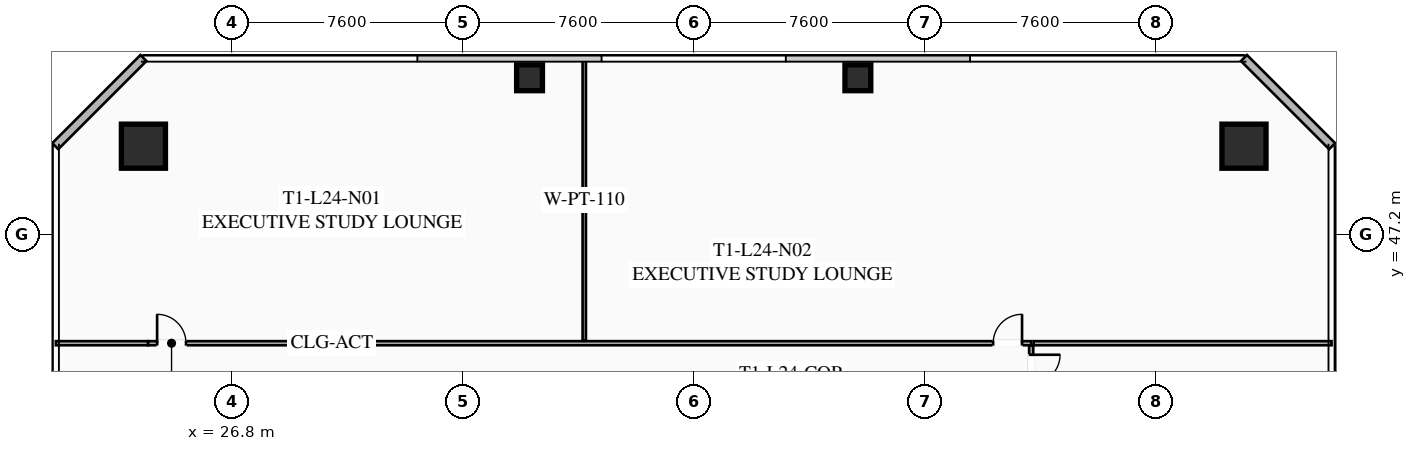
"""IFC4 building model, lengths in metres.
Left out: names, types, materials, properties, quantities, classifications, styles, units other than length and angle.
Written with IfcOpenShell. Run it as: python <this file> out.ifc"""

import sys

from ifc_helpers import new_model, si_unit, direction, frame, frame_2d, origin, origin_2d, place, context, subcontext, project, spatial, rectangle, hollow_rectangle, extrude, element, fill, save


model = new_model("IFC4")
c1 = context("Model", 3, precision=1e-05, world=origin(), true_north=direction((0.0, 1.0)))
c2 = subcontext(c1, "Body", "Model", "MODEL_VIEW")
j1 = project(units=[si_unit("LENGTHUNIT", "METRE"), si_unit("PLANEANGLEUNIT", "RADIAN")], contexts=[c1])
p1 = place(None, origin())
s1 = spatial("IfcSite", under=j1, at=p1, CompositionType="ELEMENT")
p2 = place(p1, origin())
s2 = spatial("IfcBuilding", under=s1, at=p2, CompositionType="ELEMENT")
p3 = place(p2, frame((0.0, 0.0, 92.05)))
s3 = spatial("IfcBuildingStorey", under=s2, at=p3, CompositionType="ELEMENT", Elevation=92.05)
for number, where, z_axis, x_axis in (
    (1, (60.1, 50.1, 0.0), (0.0, 0.0, 1.0), (1.0, 0.0, 0.0)),
    (2, (23.9, 50.1, 0.0), (0.0, 0.0, 1.0), (1.0, 0.0, 0.0)),
):
    element("IfcColumn", number, at=place(p3, frame(where, z_axis=z_axis, x_axis=x_axis)), inside=s3, PredefinedType="COLUMN", context=c2, shape_type="SweptSolid", body=[
        extrude(hollow_rectangle(XDim=1.45, YDim=1.45, WallThickness=0.055, at=origin_2d()), origin(), (0.0, 0.0, 1.0), 3.35),
    ])
for number, where, z_axis, x_axis in (
    (3, (47.4, 52.35, 0.0), (0.0, 0.0, 1.0), (1.0, 0.0, 0.0)),
    (4, (36.6, 52.35, 0.0), (0.0, 0.0, 1.0), (1.0, 0.0, 0.0)),
):
    element("IfcColumn", number, at=place(p3, frame(where, z_axis=z_axis, x_axis=x_axis)), inside=s3, PredefinedType="COLUMN", context=c2, shape_type="SweptSolid", body=[
        extrude(hollow_rectangle(XDim=0.85, YDim=0.85, WallThickness=0.035, at=origin_2d()), origin(), (0.0, 0.0, 1.0), 3.35),
    ])
for number, where, z_axis, x_axis in (
    (5, (21.0, 50.1, 0.0), (0.0, 0.0, 1.0), (0.707, 0.707, 0.0)),
    (6, (60.1, 53.0, 0.0), (0.0, 0.0, 1.0), (0.707, -0.707, 0.0)),
):
    element("IfcWall", number, at=place(p3, frame(where, z_axis=z_axis, x_axis=x_axis)), inside=s3, PredefinedType="SOLIDWALL", context=c2, shape_type="SweptSolid", body=[
        extrude(rectangle(XDim=4.101, YDim=0.28, at=frame_2d((2.051, 0.0))), origin(), (0.0, 0.0, 1.0), 3.35),
    ])
p4 = place(p3, frame((24.05, 43.62, 0.0), z_axis=(0.0, 0.0, 1.0), x_axis=(1.0, 0.0, 0.0)))
e7 = element("IfcWall", 7, at=p4, inside=s3, PredefinedType="PARTITIONING", context=c2, shape_type="SweptSolid", body=[
    extrude(rectangle(XDim=29.05, YDim=0.135, at=frame_2d((14.525, 0.0))), origin(), (0.0, 0.0, 1.0), 2.703),
])
p5 = place(p4, frame((0.3, 0.0, 0.0)))
e8 = element("IfcOpeningElement", 8, at=p5, cuts=e7, PredefinedType="OPENING", context=c2, shape_type="SweptSolid", body=[
    extrude(rectangle(XDim=0.95, YDim=2.05, at=frame_2d((0.475, 1.025))), frame((0.0, 0.077, 0.0), z_axis=(0.0, -1.0, 0.0), x_axis=(1.0, 0.0, 0.0)), (0.0, 0.0, 1.0), 0.155),
])
p6 = place(p4, frame((27.8, 0.0, 0.0)))
e9 = element("IfcOpeningElement", 9, at=p6, cuts=e7, PredefinedType="OPENING", context=c2, shape_type="SweptSolid", body=[
    extrude(rectangle(XDim=0.95, YDim=2.05, at=frame_2d((0.475, 1.025))), frame((0.0, 0.077, 0.0), z_axis=(0.0, -1.0, 0.0), x_axis=(1.0, 0.0, 0.0)), (0.0, 0.0, 1.0), 0.155),
])
p7 = place(p3, frame((21.02, 43.62, 0.0), z_axis=(0.0, 0.0, 1.0), x_axis=(1.0, 0.0, 0.0)))
e10 = element("IfcWall", 10, at=p7, inside=s3, PredefinedType="PARTITIONING", context=c2, shape_type="SweptSolid", body=[
    extrude(rectangle(XDim=3.03, YDim=0.135, at=frame_2d((1.515, 0.0))), origin(), (0.0, 0.0, 1.0), 2.703),
])
p8 = place(p3, frame((38.4, 43.7, 0.0), z_axis=(0.0, 0.0, 1.0), x_axis=(0.0, 1.0, 0.0)))
e11 = element("IfcWall", 11, at=p8, inside=s3, PredefinedType="PARTITIONING", context=c2, shape_type="SweptSolid", body=[
    extrude(rectangle(XDim=9.28, YDim=0.11, at=frame_2d((4.64, 0.0))), origin(), (0.0, 0.0, 1.0), 2.703),
])
p9 = place(p3, frame((53.1, 43.54, 0.0), z_axis=(0.0, 0.0, 1.0), x_axis=(0.0, -1.0, 0.0)))
e12 = element("IfcWall", 12, at=p9, inside=s3, PredefinedType="PARTITIONING", context=c2, shape_type="SweptSolid", body=[
    extrude(rectangle(XDim=20.91, YDim=0.135, at=frame_2d((10.455, 0.0))), origin(), (0.0, 0.0, 1.0), 2.703),
])
p10 = place(p9, frame((10.769, 0.0, 0.0)))
e13 = element("IfcOpeningElement", 13, at=p10, cuts=e12, PredefinedType="OPENING", context=c2, shape_type="SweptSolid", body=[
    extrude(rectangle(XDim=0.95, YDim=2.05, at=frame_2d((0.475, 1.025))), frame((0.0, 0.077, 0.0), z_axis=(0.0, -1.0, 0.0), x_axis=(1.0, 0.0, 0.0)), (0.0, 0.0, 1.0), 0.155),
])
p11 = place(p9, frame((0.3, 0.0, 0.0)))
e14 = element("IfcOpeningElement", 14, at=p11, cuts=e12, PredefinedType="OPENING", context=c2, shape_type="SweptSolid", body=[
    extrude(rectangle(XDim=0.95, YDim=2.05, at=frame_2d((0.475, 1.025))), frame((0.0, 0.077, 0.0), z_axis=(0.0, -1.0, 0.0), x_axis=(1.0, 0.0, 0.0)), (0.0, 0.0, 1.0), 0.155),
])
p12 = place(p3, frame((62.98, 43.62, 0.0), z_axis=(0.0, 0.0, 1.0), x_axis=(-1.0, 0.0, 0.0)))
e15 = element("IfcWall", 15, at=p12, inside=s3, PredefinedType="PARTITIONING", context=c2, shape_type="SweptSolid", body=[
    extrude(rectangle(XDim=9.8, YDim=0.135, at=frame_2d((4.9, 0.0))), origin(), (0.0, 0.0, 1.0), 2.703),
])
p13 = place(p5, origin())
e16 = element("IfcDoor", 16, at=p13, inside=s3, OperationType="SINGLE_SWING_LEFT", PredefinedType="DOOR", context=c2, shape_type="SweptSolid", body=[
    extrude(rectangle(XDim=0.95, YDim=2.05, at=frame_2d((0.475, 1.025))), frame((0.0, 0.025, 0.0), z_axis=(0.0, -1.0, 0.0), x_axis=(1.0, 0.0, 0.0)), (0.0, 0.0, 1.0), 0.05),
])
fill(e8, e16)
p14 = place(p6, origin())
e17 = element("IfcDoor", 17, at=p14, inside=s3, OperationType="SINGLE_SWING_RIGHT", PredefinedType="DOOR", context=c2, shape_type="SweptSolid", body=[
    extrude(rectangle(XDim=0.95, YDim=2.05, at=frame_2d((0.475, 1.025))), frame((0.0, 0.025, 0.0), z_axis=(0.0, -1.0, 0.0), x_axis=(1.0, 0.0, 0.0)), (0.0, 0.0, 1.0), 0.05),
])
fill(e9, e17)
p15 = place(p11, origin())
e18 = element("IfcDoor", 18, at=p15, inside=s3, OperationType="SINGLE_SWING_LEFT", PredefinedType="DOOR", context=c2, shape_type="SweptSolid", body=[
    extrude(rectangle(XDim=0.95, YDim=2.05, at=frame_2d((0.475, 1.025))), frame((0.0, 0.025, 0.0), z_axis=(0.0, -1.0, 0.0), x_axis=(1.0, 0.0, 0.0)), (0.0, 0.0, 1.0), 0.05),
])
fill(e14, e18)
save(model, sys.argv[1])
